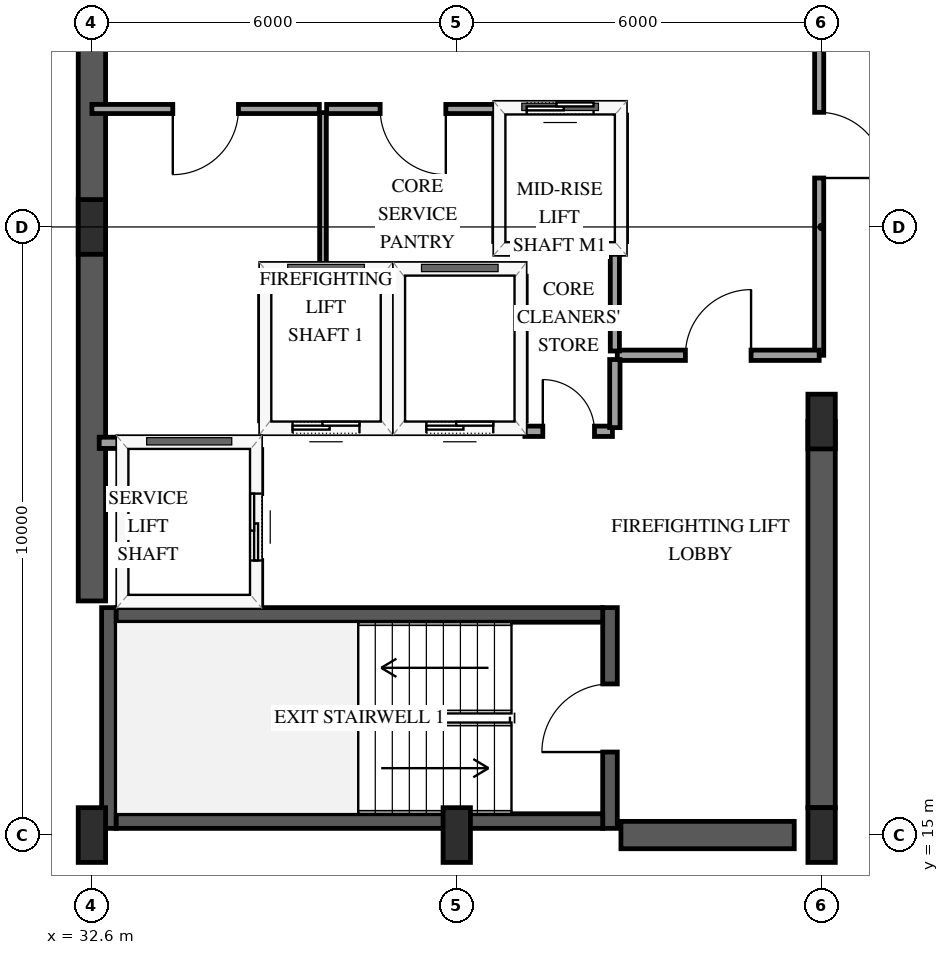
"""IFC4 building model, lengths in metres.
Left out: names, types, materials, properties, quantities, classifications, styles, units other than length and angle.
Written with IfcOpenShell. Run it as: python <this file> out.ifc"""

import sys

from ifc_helpers import new_model, si_unit, direction, frame, frame_2d, origin, origin_2d, place, context, subcontext, project, spatial, rectangle, extrude, element, fill, save


model = new_model("IFC4")
c1 = context("Model", 3, precision=1e-05, world=origin(), true_north=direction((0.0, 1.0)))
c2 = subcontext(c1, "Body", "Model", "MODEL_VIEW")
j1 = project(units=[si_unit("LENGTHUNIT", "METRE"), si_unit("PLANEANGLEUNIT", "RADIAN")], contexts=[c1])
p1 = place(None, origin())
s1 = spatial("IfcSite", under=j1, at=p1, CompositionType="ELEMENT")
p2 = place(p1, origin())
s2 = spatial("IfcBuilding", under=s1, at=p2, CompositionType="ELEMENT")
p3 = place(p2, frame((0.0, 0.0, 219.4)))
s3 = spatial("IfcBuildingStorey", under=s2, at=p3, CompositionType="ELEMENT", Elevation=219.4)
p4 = place(p3, frame((32.88, 15.11, 0.0), z_axis=(0.0, 0.0, 1.0), x_axis=(0.0, 1.0, 0.0)))
e1 = element("IfcWall", 1, at=p4, inside=s3, PredefinedType="SHEAR", context=c2, shape_type="SweptSolid", body=[
    extrude(rectangle(XDim=3.63, YDim=0.24, at=frame_2d((1.815, 0.0))), origin(), (0.0, 0.0, 1.0), 3.6),
])
p5 = place(p3, frame((41.12, 15.11, 0.0), z_axis=(0.0, 0.0, 1.0), x_axis=(0.0, 1.0, 0.0)))
e2 = element("IfcWall", 2, at=p5, inside=s3, PredefinedType="SHEAR", context=c2, shape_type="SweptSolid", body=[
    extrude(rectangle(XDim=3.63, YDim=0.24, at=frame_2d((1.815, 0.0))), origin(), (0.0, 0.0, 1.0), 3.6),
])
p6 = place(p5, frame((1.255, 0.0, 0.0)))
e3 = element("IfcOpeningElement", 3, at=p6, cuts=e2, PredefinedType="OPENING", context=c2, shape_type="SweptSolid", body=[
    extrude(rectangle(XDim=1.12, YDim=2.15, at=frame_2d((0.56, 1.075))), frame((0.0, 0.13, 0.0), z_axis=(0.0, -1.0, 0.0), x_axis=(1.0, 0.0, 0.0)), (0.0, 0.0, 1.0), 0.26),
])
for number, where, z_axis, x_axis in (
    (4, (33.0, 15.23, 0.0), (0.0, 0.0, 1.0), (1.0, 0.0, 0.0)),
    (5, (33.0, 18.62, 0.0), (0.0, 0.0, 1.0), (1.0, 0.0, 0.0)),
):
    element("IfcWall", number, at=place(p3, frame(where, z_axis=z_axis, x_axis=x_axis)), inside=s3, PredefinedType="SHEAR", context=c2, shape_type="SweptSolid", body=[
        extrude(rectangle(XDim=8.0, YDim=0.24, at=frame_2d((4.0, 0.0))), origin(), (0.0, 0.0, 1.0), 3.6),
    ])
p7 = place(p3, frame((32.6, 18.85, 0.0), z_axis=(0.0, 0.0, 1.0), x_axis=(0.0, 1.0, 0.0)))
e6 = element("IfcWall", 6, at=p7, inside=s3, PredefinedType="SHEAR", context=c2, shape_type="SweptSolid", body=[
    extrude(rectangle(XDim=12.3, YDim=0.45, at=frame_2d((6.15, 0.0))), origin(), (0.0, 0.0, 1.0), 3.6),
])
p8 = place(p3, frame((41.3, 15.0, 0.0), z_axis=(0.0, 0.0, 1.0), x_axis=(1.0, 0.0, 0.0)))
e7 = element("IfcWall", 7, at=p8, inside=s3, PredefinedType="SHEAR", context=c2, shape_type="SweptSolid", body=[
    extrude(rectangle(XDim=2.85, YDim=0.45, at=frame_2d((1.425, 0.0))), origin(), (0.0, 0.0, 1.0), 3.6),
])
p9 = place(p3, frame((44.6, 15.45, 0.0), z_axis=(0.0, 0.0, 1.0), x_axis=(0.0, 1.0, 0.0)))
e8 = element("IfcWall", 8, at=p9, inside=s3, PredefinedType="SHEAR", context=c2, shape_type="SweptSolid", body=[
    extrude(rectangle(XDim=6.35, YDim=0.45, at=frame_2d((3.175, 0.0))), origin(), (0.0, 0.0, 1.0), 3.6),
])
for number, where, z_axis, x_axis in (
    (9, (32.6, 15.0, 0.0), (0.0, 0.0, 1.0), (1.0, 0.0, 0.0)),
    (10, (32.6, 25.0, 0.0), (0.0, 0.0, 1.0), (1.0, 0.0, 0.0)),
    (11, (38.6, 15.0, 0.0), (0.0, 0.0, 1.0), (1.0, 0.0, 0.0)),
    (12, (44.6, 15.0, 0.0), (0.0, 0.0, 1.0), (1.0, 0.0, 0.0)),
    (13, (44.6, 21.8, 0.0), (0.0, 0.0, 1.0), (1.0, 0.0, 0.0)),
):
    element("IfcColumn", number, at=place(p3, frame(where, z_axis=z_axis, x_axis=x_axis)), inside=s3, PredefinedType="PILASTER", context=c2, shape_type="SweptSolid", body=[
        extrude(rectangle(XDim=0.45, YDim=0.9, at=origin_2d()), origin(), (0.0, 0.0, 1.0), 3.6),
    ])
p10 = place(p3, frame((35.45, 21.7, 0.0), z_axis=(0.0, 0.0, 1.0), x_axis=(1.0, 0.0, 0.0)))
e14 = element("IfcWall", 14, at=p10, inside=s3, PredefinedType="SOLIDWALL", context=c2, shape_type="SweptSolid", body=[
    extrude(rectangle(XDim=2.0, YDim=0.185, at=frame_2d((1.0, 0.0))), origin(), (0.0, 0.0, 1.0), 3.3),
])
p11 = place(p10, frame((0.45, 0.0, 0.0)))
e15 = element("IfcOpeningElement", 15, at=p11, cuts=e14, PredefinedType="OPENING", context=c2, shape_type="SweptSolid", body=[
    extrude(rectangle(XDim=1.1, YDim=2.15, at=frame_2d((0.55, 1.075))), frame((0.0, 0.103, 0.0), z_axis=(0.0, -1.0, 0.0), x_axis=(1.0, 0.0, 0.0)), (0.0, 0.0, 1.0), 0.205),
])
p12 = place(p3, frame((35.45, 24.3, 0.0), z_axis=(0.0, 0.0, 1.0), x_axis=(1.0, 0.0, 0.0)))
e16 = element("IfcWall", 16, at=p12, inside=s3, PredefinedType="SOLIDWALL", context=c2, shape_type="SweptSolid", body=[
    extrude(rectangle(XDim=2.0, YDim=0.185, at=frame_2d((1.0, 0.0))), origin(), (0.0, 0.0, 1.0), 3.3),
])
for number, where, z_axis, x_axis in (
    (17, (35.45, 21.81, 0.0), (0.0, 0.0, 1.0), (0.0, 1.0, 0.0)),
    (18, (37.45, 21.81, 0.0), (0.0, 0.0, 1.0), (0.0, 1.0, 0.0)),
):
    element("IfcWall", number, at=place(p3, frame(where, z_axis=z_axis, x_axis=x_axis)), inside=s3, PredefinedType="SOLIDWALL", context=c2, shape_type="SweptSolid", body=[
        extrude(rectangle(XDim=2.38, YDim=0.185, at=frame_2d((1.19, 0.0))), origin(), (0.0, 0.0, 1.0), 3.3),
    ])
p13 = place(p3, frame((37.65, 21.7, 0.0), z_axis=(0.0, 0.0, 1.0), x_axis=(1.0, 0.0, 0.0)))
e19 = element("IfcWall", 19, at=p13, inside=s3, PredefinedType="SOLIDWALL", context=c2, shape_type="SweptSolid", body=[
    extrude(rectangle(XDim=2.0, YDim=0.185, at=frame_2d((1.0, 0.0))), origin(), (0.0, 0.0, 1.0), 3.3),
])
p14 = place(p13, frame((0.45, 0.0, 0.0)))
e20 = element("IfcOpeningElement", 20, at=p14, cuts=e19, PredefinedType="OPENING", context=c2, shape_type="SweptSolid", body=[
    extrude(rectangle(XDim=1.1, YDim=2.15, at=frame_2d((0.55, 1.075))), frame((0.0, 0.103, 0.0), z_axis=(0.0, -1.0, 0.0), x_axis=(1.0, 0.0, 0.0)), (0.0, 0.0, 1.0), 0.205),
])
p15 = place(p3, frame((37.65, 24.3, 0.0), z_axis=(0.0, 0.0, 1.0), x_axis=(1.0, 0.0, 0.0)))
e21 = element("IfcWall", 21, at=p15, inside=s3, PredefinedType="SOLIDWALL", context=c2, shape_type="SweptSolid", body=[
    extrude(rectangle(XDim=2.0, YDim=0.185, at=frame_2d((1.0, 0.0))), origin(), (0.0, 0.0, 1.0), 3.3),
])
p16 = place(p3, frame((39.65, 21.81, 0.0), z_axis=(0.0, 0.0, 1.0), x_axis=(0.0, 1.0, 0.0)))
e22 = element("IfcWall", 22, at=p16, inside=s3, PredefinedType="SOLIDWALL", context=c2, shape_type="SweptSolid", body=[
    extrude(rectangle(XDim=2.38, YDim=0.185, at=frame_2d((1.19, 0.0))), origin(), (0.0, 0.0, 1.0), 3.3),
])
p17 = place(p3, frame((32.72, 21.45, 0.0), z_axis=(0.0, 0.0, 1.0), x_axis=(1.0, 0.0, 0.0)))
e23 = element("IfcWall", 23, at=p17, inside=s3, PredefinedType="SOLIDWALL", context=c2, shape_type="SweptSolid", body=[
    extrude(rectangle(XDim=2.58, YDim=0.185, at=frame_2d((1.29, 0.0))), origin(), (0.0, 0.0, 1.0), 3.3),
])
p18 = place(p3, frame((35.3, 18.79, 0.0), z_axis=(0.0, 0.0, 1.0), x_axis=(0.0, 1.0, 0.0)))
e24 = element("IfcWall", 24, at=p18, inside=s3, PredefinedType="SOLIDWALL", context=c2, shape_type="SweptSolid", body=[
    extrude(rectangle(XDim=2.55, YDim=0.185, at=frame_2d((1.275, 0.0))), origin(), (0.0, 0.0, 1.0), 3.3),
])
p19 = place(p18, frame((0.725, 0.0, 0.0)))
e25 = element("IfcOpeningElement", 25, at=p19, cuts=e24, PredefinedType="OPENING", context=c2, shape_type="SweptSolid", body=[
    extrude(rectangle(XDim=1.1, YDim=2.15, at=frame_2d((0.55, 1.075))), frame((0.0, 0.103, 0.0), z_axis=(0.0, -1.0, 0.0), x_axis=(1.0, 0.0, 0.0)), (0.0, 0.0, 1.0), 0.205),
])
p20 = place(p3, frame((39.3, 24.65, 0.0), z_axis=(0.0, 0.0, 1.0), x_axis=(1.0, 0.0, 0.0)))
e26 = element("IfcWall", 26, at=p20, inside=s3, PredefinedType="SOLIDWALL", context=c2, shape_type="SweptSolid", body=[
    extrude(rectangle(XDim=2.0, YDim=0.185, at=frame_2d((1.0, 0.0))), origin(), (0.0, 0.0, 1.0), 3.3),
])
p21 = place(p3, frame((39.3, 26.95, 0.0), z_axis=(0.0, 0.0, 1.0), x_axis=(1.0, 0.0, 0.0)))
e27 = element("IfcWall", 27, at=p21, inside=s3, PredefinedType="SOLIDWALL", context=c2, shape_type="SweptSolid", body=[
    extrude(rectangle(XDim=2.0, YDim=0.185, at=frame_2d((1.0, 0.0))), origin(), (0.0, 0.0, 1.0), 3.3),
])
p22 = place(p21, frame((0.45, 0.0, 0.0)))
e28 = element("IfcOpeningElement", 28, at=p22, cuts=e27, PredefinedType="OPENING", context=c2, shape_type="SweptSolid", body=[
    extrude(rectangle(XDim=1.1, YDim=2.15, at=frame_2d((0.55, 1.075))), frame((0.0, 0.103, 0.0), z_axis=(0.0, -1.0, 0.0), x_axis=(1.0, 0.0, 0.0)), (0.0, 0.0, 1.0), 0.205),
])
for number, where, z_axis, x_axis in (
    (29, (39.3, 24.76, 0.0), (0.0, 0.0, 1.0), (0.0, 1.0, 0.0)),
    (30, (41.3, 24.76, 0.0), (0.0, 0.0, 1.0), (0.0, 1.0, 0.0)),
):
    element("IfcWall", number, at=place(p3, frame(where, z_axis=z_axis, x_axis=x_axis)), inside=s3, PredefinedType="SOLIDWALL", context=c2, shape_type="SweptSolid", body=[
        extrude(rectangle(XDim=2.08, YDim=0.185, at=frame_2d((1.04, 0.0))), origin(), (0.0, 0.0, 1.0), 3.3),
    ])
p23 = place(p3, frame((44.56, 29.8, 0.0), z_axis=(0.0, 0.0, 1.0), x_axis=(0.0, -1.0, 0.0)))
e31 = element("IfcWall", 31, at=p23, inside=s3, PredefinedType="PARTITIONING", context=c2, shape_type="SweptSolid", body=[
    extrude(rectangle(XDim=6.91, YDim=0.15, at=frame_2d((3.455, 0.0))), origin(), (0.0, 0.0, 1.0), 2.34),
])
p24 = place(p23, frame((2.915, 0.0, 0.0)))
e32 = element("IfcOpeningElement", 32, at=p24, cuts=e31, PredefinedType="OPENING", context=c2, shape_type="SweptSolid", body=[
    extrude(rectangle(XDim=1.08, YDim=2.15, at=frame_2d((0.54, 1.075))), frame((0.0, 0.085, 0.0), z_axis=(0.0, -1.0, 0.0), x_axis=(1.0, 0.0, 0.0)), (0.0, 0.0, 1.0), 0.17),
])
p25 = place(p3, frame((36.34, 26.94, 0.0), z_axis=(0.0, 0.0, 1.0), x_axis=(-1.0, 0.0, 0.0)))
e33 = element("IfcWall", 33, at=p25, inside=s3, PredefinedType="PARTITIONING", context=c2, shape_type="SweptSolid", body=[
    extrude(rectangle(XDim=3.74, YDim=0.15, at=frame_2d((1.87, 0.0))), origin(), (0.0, 0.0, 1.0), 3.3),
])
p26 = place(p25, frame((1.33, 0.0, 0.0)))
e34 = element("IfcOpeningElement", 34, at=p26, cuts=e33, PredefinedType="OPENING", context=c2, shape_type="SweptSolid", body=[
    extrude(rectangle(XDim=1.08, YDim=2.15, at=frame_2d((0.54, 1.075))), frame((0.0, 0.085, 0.0), z_axis=(0.0, -1.0, 0.0), x_axis=(1.0, 0.0, 0.0)), (0.0, 0.0, 1.0), 0.17),
])
p27 = place(p3, frame((41.24, 22.89, 0.0), z_axis=(0.0, 0.0, 1.0), x_axis=(1.0, 0.0, 0.0)))
e35 = element("IfcWall", 35, at=p27, inside=s3, PredefinedType="PARTITIONING", context=c2, shape_type="SweptSolid", body=[
    extrude(rectangle(XDim=3.32, YDim=0.17, at=frame_2d((1.66, 0.0))), origin(), (0.0, 0.0, 1.0), 3.3),
])
p28 = place(p27, frame((1.12, 0.0, 0.0)))
e36 = element("IfcOpeningElement", 36, at=p28, cuts=e35, PredefinedType="OPENING", context=c2, shape_type="SweptSolid", body=[
    extrude(rectangle(XDim=1.08, YDim=2.15, at=frame_2d((0.54, 1.075))), frame((0.0, 0.095, 0.0), z_axis=(0.0, -1.0, 0.0), x_axis=(1.0, 0.0, 0.0)), (0.0, 0.0, 1.0), 0.19),
])
p29 = place(p3, frame((39.3, 26.94, 0.0), z_axis=(0.0, 0.0, 1.0), x_axis=(-1.0, 0.0, 0.0)))
e37 = element("IfcWall", 37, at=p29, inside=s3, PredefinedType="PARTITIONING", context=c2, shape_type="SweptSolid", body=[
    extrude(rectangle(XDim=2.84, YDim=0.15, at=frame_2d((1.42, 0.0))), origin(), (0.0, 0.0, 1.0), 3.3),
])
p30 = place(p29, frame((0.88, 0.0, 0.0)))
e38 = element("IfcOpeningElement", 38, at=p30, cuts=e37, PredefinedType="OPENING", context=c2, shape_type="SweptSolid", body=[
    extrude(rectangle(XDim=1.08, YDim=2.15, at=frame_2d((0.54, 1.075))), frame((0.0, 0.085, 0.0), z_axis=(0.0, -1.0, 0.0), x_axis=(1.0, 0.0, 0.0)), (0.0, 0.0, 1.0), 0.17),
])
p31 = place(p3, frame((36.4, 26.88, 0.0), z_axis=(0.0, 0.0, 1.0), x_axis=(0.0, -1.0, 0.0)))
e39 = element("IfcWall", 39, at=p31, inside=s3, PredefinedType="PARTITIONING", context=c2, shape_type="SweptSolid", body=[
    extrude(rectangle(XDim=2.58, YDim=0.11, at=frame_2d((1.29, 0.0))), origin(), (0.0, 0.0, 1.0), 3.3),
])
p32 = place(p3, frame((41.2, 22.96, 0.0), z_axis=(0.0, 0.0, 1.0), x_axis=(0.0, 1.0, 0.0)))
e40 = element("IfcWall", 40, at=p32, inside=s3, PredefinedType="PARTITIONING", context=c2, shape_type="SweptSolid", body=[
    extrude(rectangle(XDim=1.69, YDim=0.15, at=frame_2d((0.845, 0.0))), origin(), (0.0, 0.0, 1.0), 3.3),
])
p33 = place(p3, frame((39.72, 21.64, 0.0), z_axis=(0.0, 0.0, 1.0), x_axis=(1.0, 0.0, 0.0)))
e41 = element("IfcWall", 41, at=p33, inside=s3, PredefinedType="PARTITIONING", context=c2, shape_type="SweptSolid", body=[
    extrude(rectangle(XDim=1.44, YDim=0.17, at=frame_2d((0.72, 0.0))), origin(), (0.0, 0.0, 1.0), 3.3),
])
p34 = place(p33, frame((0.295, 0.0, 0.0)))
e42 = element("IfcOpeningElement", 42, at=p34, cuts=e41, PredefinedType="OPENING", context=c2, shape_type="SweptSolid", body=[
    extrude(rectangle(XDim=0.85, YDim=2.1, at=frame_2d((0.425, 1.05))), frame((0.0, 0.095, 0.0), z_axis=(0.0, -1.0, 0.0), x_axis=(1.0, 0.0, 0.0)), (0.0, 0.0, 1.0), 0.19),
])
p35 = place(p3, frame((41.2, 21.7, 0.0), z_axis=(0.0, 0.0, 1.0), x_axis=(0.0, 1.0, 0.0)))
e43 = element("IfcWall", 43, at=p35, inside=s3, PredefinedType="PARTITIONING", context=c2, shape_type="SweptSolid", body=[
    extrude(rectangle(XDim=1.12, YDim=0.17, at=frame_2d((0.56, 0.0))), origin(), (0.0, 0.0, 1.0), 3.3),
])
p36 = place(p11, origin())
e44 = element("IfcDoor", 44, at=p36, inside=s3, OperationType="SLIDING_TO_LEFT", PredefinedType="DOOR", context=c2, shape_type="SweptSolid", body=[
    extrude(rectangle(XDim=1.1, YDim=2.15, at=frame_2d((0.55, 1.075))), frame((0.0, 0.025, 0.0), z_axis=(0.0, -1.0, 0.0), x_axis=(1.0, 0.0, 0.0)), (0.0, 0.0, 1.0), 0.05),
])
fill(e15, e44)
p37 = place(p14, origin())
e45 = element("IfcDoor", 45, at=p37, inside=s3, OperationType="SLIDING_TO_LEFT", PredefinedType="DOOR", context=c2, shape_type="SweptSolid", body=[
    extrude(rectangle(XDim=1.1, YDim=2.15, at=frame_2d((0.55, 1.075))), frame((0.0, 0.025, 0.0), z_axis=(0.0, -1.0, 0.0), x_axis=(1.0, 0.0, 0.0)), (0.0, 0.0, 1.0), 0.05),
])
fill(e20, e45)
p38 = place(p19, origin())
e46 = element("IfcDoor", 46, at=p38, inside=s3, OperationType="SLIDING_TO_LEFT", PredefinedType="DOOR", context=c2, shape_type="SweptSolid", body=[
    extrude(rectangle(XDim=1.1, YDim=2.15, at=frame_2d((0.55, 1.075))), frame((0.0, 0.025, 0.0), z_axis=(0.0, -1.0, 0.0), x_axis=(1.0, 0.0, 0.0)), (0.0, 0.0, 1.0), 0.05),
])
fill(e25, e46)
p39 = place(p22, origin())
e47 = element("IfcDoor", 47, at=p39, inside=s3, OperationType="SLIDING_TO_LEFT", PredefinedType="DOOR", context=c2, shape_type="SweptSolid", body=[
    extrude(rectangle(XDim=1.1, YDim=2.15, at=frame_2d((0.55, 1.075))), frame((0.0, 0.025, 0.0), z_axis=(0.0, -1.0, 0.0), x_axis=(1.0, 0.0, 0.0)), (0.0, 0.0, 1.0), 0.05),
])
fill(e28, e47)
p40 = place(p6, origin())
e48 = element("IfcDoor", 48, at=p40, inside=s3, OperationType="SINGLE_SWING_LEFT", PredefinedType="DOOR", context=c2, shape_type="SweptSolid", body=[
    extrude(rectangle(XDim=1.12, YDim=2.15, at=frame_2d((0.56, 1.075))), frame((0.0, 0.025, 0.0), z_axis=(0.0, -1.0, 0.0), x_axis=(1.0, 0.0, 0.0)), (0.0, 0.0, 1.0), 0.05),
])
fill(e3, e48)
p41 = place(p24, origin())
e49 = element("IfcDoor", 49, at=p41, inside=s3, OperationType="SINGLE_SWING_RIGHT", PredefinedType="DOOR", context=c2, shape_type="SweptSolid", body=[
    extrude(rectangle(XDim=1.08, YDim=2.15, at=frame_2d((0.54, 1.075))), frame((0.0, 0.025, 0.0), z_axis=(0.0, -1.0, 0.0), x_axis=(1.0, 0.0, 0.0)), (0.0, 0.0, 1.0), 0.05),
])
fill(e32, e49)
p42 = place(p26, origin())
e50 = element("IfcDoor", 50, at=p42, inside=s3, OperationType="SINGLE_SWING_RIGHT", PredefinedType="DOOR", context=c2, shape_type="SweptSolid", body=[
    extrude(rectangle(XDim=1.08, YDim=2.15, at=frame_2d((0.54, 1.075))), frame((0.0, 0.025, 0.0), z_axis=(0.0, -1.0, 0.0), x_axis=(1.0, 0.0, 0.0)), (0.0, 0.0, 1.0), 0.05),
])
fill(e34, e50)
p43 = place(p28, origin())
e51 = element("IfcDoor", 51, at=p43, inside=s3, OperationType="SINGLE_SWING_RIGHT", PredefinedType="DOOR", context=c2, shape_type="SweptSolid", body=[
    extrude(rectangle(XDim=1.08, YDim=2.15, at=frame_2d((0.54, 1.075))), frame((0.0, 0.025, 0.0), z_axis=(0.0, -1.0, 0.0), x_axis=(1.0, 0.0, 0.0)), (0.0, 0.0, 1.0), 0.05),
])
fill(e36, e51)
p44 = place(p30, origin())
e52 = element("IfcDoor", 52, at=p44, inside=s3, OperationType="SINGLE_SWING_LEFT", PredefinedType="DOOR", context=c2, shape_type="SweptSolid", body=[
    extrude(rectangle(XDim=1.08, YDim=2.15, at=frame_2d((0.54, 1.075))), frame((0.0, 0.025, 0.0), z_axis=(0.0, -1.0, 0.0), x_axis=(1.0, 0.0, 0.0)), (0.0, 0.0, 1.0), 0.05),
])
fill(e38, e52)
p45 = place(p34, origin())
e53 = element("IfcDoor", 53, at=p45, inside=s3, OperationType="SINGLE_SWING_LEFT", PredefinedType="DOOR", context=c2, shape_type="SweptSolid", body=[
    extrude(rectangle(XDim=0.85, YDim=2.1, at=frame_2d((0.425, 1.05))), frame((0.0, 0.025, 0.0), z_axis=(0.0, -1.0, 0.0), x_axis=(1.0, 0.0, 0.0)), (0.0, 0.0, 1.0), 0.05),
])
fill(e42, e53)
save(model, sys.argv[1])
